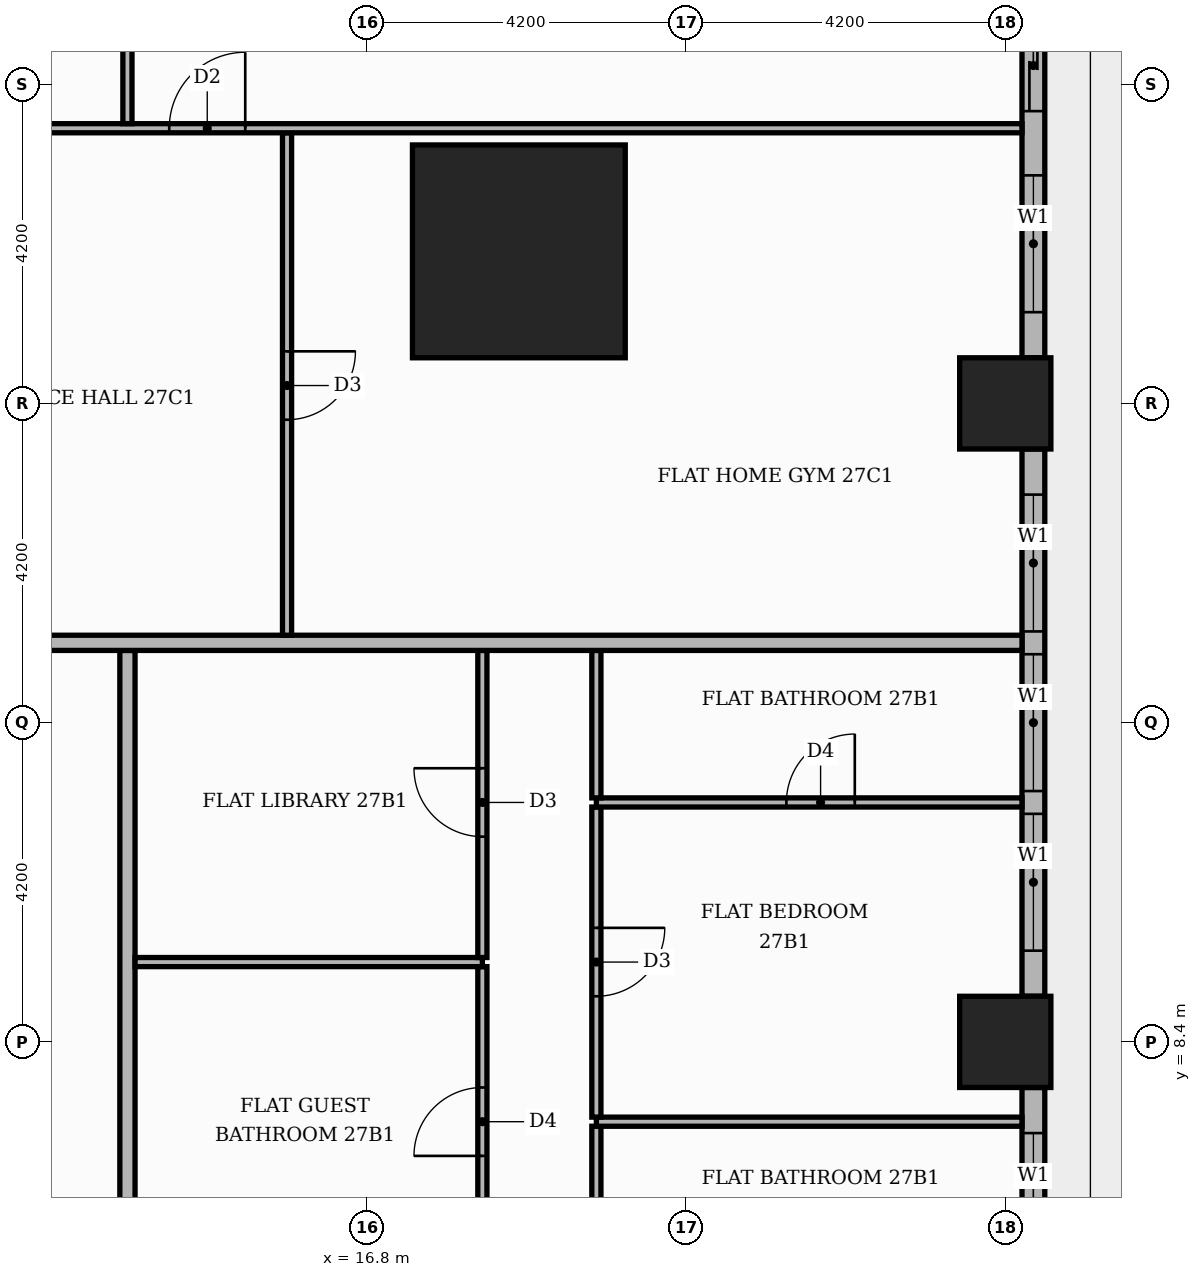
"""IFC4 building model, lengths in metres.
Left out: names, types, materials, properties, quantities, classifications, styles, units other than length and angle.
Written with IfcOpenShell. Run it as: python <this file> out.ifc"""

import sys

from ifc_helpers import new_model, si_unit, direction, frame, frame_2d, origin, origin_2d, place, context, subcontext, project, spatial, rectangle, extrude, element, fill, save


model = new_model("IFC4")
c1 = context("Model", 3, precision=1e-05, world=origin(), true_north=direction((0.0, 1.0)))
c2 = subcontext(c1, "Body", "Model", "MODEL_VIEW")
j1 = project(units=[si_unit("LENGTHUNIT", "METRE"), si_unit("PLANEANGLEUNIT", "RADIAN")], contexts=[c1])
p1 = place(None, origin())
s1 = spatial("IfcSite", under=j1, at=p1, CompositionType="ELEMENT")
p2 = place(p1, origin())
s2 = spatial("IfcBuilding", under=s1, at=p2, CompositionType="ELEMENT")
p3 = place(p2, frame((0.0, 0.0, 114.3)))
s3 = spatial("IfcBuildingStorey", under=s2, at=p3, CompositionType="ELEMENT", Elevation=114.3)
p4 = place(p3, frame((18.8, 18.8, 0.0), z_axis=(0.0, 0.0, 1.0), x_axis=(1.0, 0.0, 0.0)))
e1 = element("IfcColumn", 1, at=p4, inside=s3, PredefinedType="COLUMN", context=c2, shape_type="SweptSolid", body=[
    extrude(rectangle(XDim=2.8, YDim=2.8, at=origin_2d()), origin(), (0.0, 0.0, 1.0), 3.9),
])
for number, where, z_axis, x_axis in (
    (2, (25.2, 8.4, 0.0), (0.0, 0.0, 1.0), (1.0, 0.0, 0.0)),
    (3, (25.2, 16.8, 0.0), (0.0, 0.0, 1.0), (1.0, 0.0, 0.0)),
):
    element("IfcColumn", number, at=place(p3, frame(where, z_axis=z_axis, x_axis=x_axis)), inside=s3, PredefinedType="COLUMN", context=c2, shape_type="SweptSolid", body=[
        extrude(rectangle(XDim=1.2, YDim=1.2, at=origin_2d()), origin(), (0.0, 0.0, 1.0), 3.9),
    ])
p5 = place(p3, frame((25.57, 0.6, 0.0), z_axis=(0.0, 0.0, 1.0), x_axis=(0.0, 1.0, 0.0)))
e4 = element("IfcWall", 4, at=p5, inside=s3, PredefinedType="STANDARD", context=c2, shape_type="SweptSolid", body=[
    extrude(rectangle(XDim=7.2, YDim=0.3, at=frame_2d((3.6, 0.0))), origin(), (0.0, 0.0, 1.0), 3.48),
])
p6 = place(p5, frame((0.6, 0.0, 0.9)))
e5 = element("IfcOpeningElement", 5, at=p6, cuts=e4, PredefinedType="OPENING", context=c2, shape_type="SweptSolid", body=[
    extrude(rectangle(XDim=3.9, YDim=2.1, at=frame_2d((1.95, 1.05))), frame((0.0, 0.16, 0.0), z_axis=(0.0, -1.0, 0.0), x_axis=(1.0, 0.0, 0.0)), (0.0, 0.0, 1.0), 0.32),
])
p7 = place(p5, frame((4.8, 0.0, 0.9)))
e6 = element("IfcOpeningElement", 6, at=p7, cuts=e4, PredefinedType="OPENING", context=c2, shape_type="SweptSolid", body=[
    extrude(rectangle(XDim=1.8, YDim=2.1, at=frame_2d((0.9, 1.05))), frame((0.0, 0.16, 0.0), z_axis=(0.0, -1.0, 0.0), x_axis=(1.0, 0.0, 0.0)), (0.0, 0.0, 1.0), 0.32),
])
p8 = place(p3, frame((25.57, 9.0, 0.0), z_axis=(0.0, 0.0, 1.0), x_axis=(0.0, 1.0, 0.0)))
e7 = element("IfcWall", 7, at=p8, inside=s3, PredefinedType="STANDARD", context=c2, shape_type="SweptSolid", body=[
    extrude(rectangle(XDim=7.2, YDim=0.3, at=frame_2d((3.6, 0.0))), origin(), (0.0, 0.0, 1.0), 3.48),
])
p9 = place(p8, frame((0.6, 0.0, 0.9)))
e8 = element("IfcOpeningElement", 8, at=p9, cuts=e7, PredefinedType="OPENING", context=c2, shape_type="SweptSolid", body=[
    extrude(rectangle(XDim=1.8, YDim=2.1, at=frame_2d((0.9, 1.05))), frame((0.0, 0.16, 0.0), z_axis=(0.0, -1.0, 0.0), x_axis=(1.0, 0.0, 0.0)), (0.0, 0.0, 1.0), 0.32),
])
p10 = place(p8, frame((2.7, 0.0, 0.9)))
e9 = element("IfcOpeningElement", 9, at=p10, cuts=e7, PredefinedType="OPENING", context=c2, shape_type="SweptSolid", body=[
    extrude(rectangle(XDim=1.8, YDim=2.1, at=frame_2d((0.9, 1.05))), frame((0.0, 0.16, 0.0), z_axis=(0.0, -1.0, 0.0), x_axis=(1.0, 0.0, 0.0)), (0.0, 0.0, 1.0), 0.32),
])
p11 = place(p8, frame((4.8, 0.0, 0.9)))
e10 = element("IfcOpeningElement", 10, at=p11, cuts=e7, PredefinedType="OPENING", context=c2, shape_type="SweptSolid", body=[
    extrude(rectangle(XDim=1.8, YDim=2.1, at=frame_2d((0.9, 1.05))), frame((0.0, 0.16, 0.0), z_axis=(0.0, -1.0, 0.0), x_axis=(1.0, 0.0, 0.0)), (0.0, 0.0, 1.0), 0.32),
])
p12 = place(p3, frame((25.57, 17.4, 0.0), z_axis=(0.0, 0.0, 1.0), x_axis=(0.0, 1.0, 0.0)))
e11 = element("IfcWall", 11, at=p12, inside=s3, PredefinedType="STANDARD", context=c2, shape_type="SweptSolid", body=[
    extrude(rectangle(XDim=4.82, YDim=0.3, at=frame_2d((2.41, 0.0))), origin(), (0.0, 0.0, 1.0), 3.48),
])
p13 = place(p12, frame((0.6, 0.0, 0.9)))
e12 = element("IfcOpeningElement", 12, at=p13, cuts=e11, PredefinedType="OPENING", context=c2, shape_type="SweptSolid", body=[
    extrude(rectangle(XDim=1.8, YDim=2.1, at=frame_2d((0.9, 1.05))), frame((0.0, 0.16, 0.0), z_axis=(0.0, -1.0, 0.0), x_axis=(1.0, 0.0, 0.0)), (0.0, 0.0, 1.0), 0.32),
])
p14 = place(p12, frame((3.245, 0.0, 0.0)))
e13 = element("IfcOpeningElement", 13, at=p14, cuts=e11, PredefinedType="OPENING", context=c2, shape_type="SweptSolid", body=[
    extrude(rectangle(XDim=1.2, YDim=2.4, at=frame_2d((0.6, 1.2))), frame((0.0, 0.16, 0.0), z_axis=(0.0, -1.0, 0.0), x_axis=(1.0, 0.0, 0.0)), (0.0, 0.0, 1.0), 0.32),
])
p15 = place(p3, frame((13.65, -13.55, 0.0), z_axis=(0.0, 0.0, 1.0), x_axis=(0.0, 1.0, 0.0)))
e14 = element("IfcWall", 14, at=p15, inside=s3, PredefinedType="PARTITIONING", context=c2, shape_type="SweptSolid", body=[
    extrude(rectangle(XDim=27.1, YDim=0.2, at=frame_2d((13.55, 0.0))), origin(), (0.0, 0.0, 1.0), 3.48),
])
p16 = place(p15, frame((1.45, 0.0, 0.0)))
e15 = element("IfcOpeningElement", 15, at=p16, cuts=e14, PredefinedType="OPENING", context=c2, shape_type="SweptSolid", body=[
    extrude(rectangle(XDim=1.1, YDim=2.4, at=frame_2d((0.55, 1.2))), frame((0.0, 0.11, 0.0), z_axis=(0.0, -1.0, 0.0), x_axis=(1.0, 0.0, 0.0)), (0.0, 0.0, 1.0), 0.22),
])
p17 = place(p3, frame((18.32, 5.31, 0.0), z_axis=(0.0, 0.0, 1.0), x_axis=(0.0, 1.0, 0.0)))
e16 = element("IfcWall", 16, at=p17, inside=s3, PredefinedType="PARTITIONING", context=c2, shape_type="SweptSolid", body=[
    extrude(rectangle(XDim=4.08, YDim=0.12, at=frame_2d((2.04, 0.0))), origin(), (0.0, 0.0, 1.0), 3.48),
])
p18 = place(p17, frame((1.59, 0.0, 0.0)))
e17 = element("IfcOpeningElement", 17, at=p18, cuts=e16, PredefinedType="OPENING", context=c2, shape_type="SweptSolid", body=[
    extrude(rectangle(XDim=0.9, YDim=2.1, at=frame_2d((0.45, 1.05))), frame((0.0, 0.07, 0.0), z_axis=(0.0, -1.0, 0.0), x_axis=(1.0, 0.0, 0.0)), (0.0, 0.0, 1.0), 0.14),
])
p19 = place(p3, frame((19.82, 5.31, 0.0), z_axis=(0.0, 0.0, 1.0), x_axis=(0.0, 1.0, 0.0)))
e18 = element("IfcWall", 18, at=p19, inside=s3, PredefinedType="PARTITIONING", context=c2, shape_type="SweptSolid", body=[
    extrude(rectangle(XDim=1.98, YDim=0.12, at=frame_2d((0.99, 0.0))), origin(), (0.0, 0.0, 1.0), 3.48),
])
p20 = place(p3, frame((19.82, 7.35, 0.0), z_axis=(0.0, 0.0, 1.0), x_axis=(1.0, 0.0, 0.0)))
e19 = element("IfcWall", 19, at=p20, inside=s3, PredefinedType="PARTITIONING", context=c2, shape_type="SweptSolid", body=[
    extrude(rectangle(XDim=5.6, YDim=0.12, at=frame_2d((2.8, 0.0))), origin(), (0.0, 0.0, 1.0), 3.48),
])
p21 = place(p3, frame((19.82, 7.41, 0.0), z_axis=(0.0, 0.0, 1.0), x_axis=(0.0, 1.0, 0.0)))
e20 = element("IfcWall", 20, at=p21, inside=s3, PredefinedType="PARTITIONING", context=c2, shape_type="SweptSolid", body=[
    extrude(rectangle(XDim=4.08, YDim=0.12, at=frame_2d((2.04, 0.0))), origin(), (0.0, 0.0, 1.0), 3.48),
])
p22 = place(p21, frame((1.59, 0.0, 0.0)))
e21 = element("IfcOpeningElement", 21, at=p22, cuts=e20, PredefinedType="OPENING", context=c2, shape_type="SweptSolid", body=[
    extrude(rectangle(XDim=0.9, YDim=2.1, at=frame_2d((0.45, 1.05))), frame((0.0, 0.07, 0.0), z_axis=(0.0, -1.0, 0.0), x_axis=(1.0, 0.0, 0.0)), (0.0, 0.0, 1.0), 0.14),
])
p23 = place(p3, frame((13.75, 9.45, 0.0), z_axis=(0.0, 0.0, 1.0), x_axis=(1.0, 0.0, 0.0)))
e22 = element("IfcWall", 22, at=p23, inside=s3, PredefinedType="PARTITIONING", context=c2, shape_type="SweptSolid", body=[
    extrude(rectangle(XDim=4.57, YDim=0.12, at=frame_2d((2.285, 0.0))), origin(), (0.0, 0.0, 1.0), 3.48),
])
p24 = place(p3, frame((18.32, 9.51, 0.0), z_axis=(0.0, 0.0, 1.0), x_axis=(0.0, 1.0, 0.0)))
e23 = element("IfcWall", 23, at=p24, inside=s3, PredefinedType="PARTITIONING", context=c2, shape_type="SweptSolid", body=[
    extrude(rectangle(XDim=4.04, YDim=0.12, at=frame_2d((2.02, 0.0))), origin(), (0.0, 0.0, 1.0), 3.48),
])
p25 = place(p24, frame((1.59, 0.0, 0.0)))
e24 = element("IfcOpeningElement", 24, at=p25, cuts=e23, PredefinedType="OPENING", context=c2, shape_type="SweptSolid", body=[
    extrude(rectangle(XDim=0.9, YDim=2.1, at=frame_2d((0.45, 1.05))), frame((0.0, 0.07, 0.0), z_axis=(0.0, -1.0, 0.0), x_axis=(1.0, 0.0, 0.0)), (0.0, 0.0, 1.0), 0.14),
])
p26 = place(p3, frame((19.82, 11.55, 0.0), z_axis=(0.0, 0.0, 1.0), x_axis=(1.0, 0.0, 0.0)))
e25 = element("IfcWall", 25, at=p26, inside=s3, PredefinedType="PARTITIONING", context=c2, shape_type="SweptSolid", body=[
    extrude(rectangle(XDim=5.6, YDim=0.12, at=frame_2d((2.8, 0.0))), origin(), (0.0, 0.0, 1.0), 3.48),
])
p27 = place(p26, frame((2.5, 0.0, 0.0)))
e26 = element("IfcOpeningElement", 26, at=p27, cuts=e25, PredefinedType="OPENING", context=c2, shape_type="SweptSolid", body=[
    extrude(rectangle(XDim=0.9, YDim=2.1, at=frame_2d((0.45, 1.05))), frame((0.0, 0.07, 0.0), z_axis=(0.0, -1.0, 0.0), x_axis=(1.0, 0.0, 0.0)), (0.0, 0.0, 1.0), 0.14),
])
p28 = place(p3, frame((19.82, 11.61, 0.0), z_axis=(0.0, 0.0, 1.0), x_axis=(0.0, 1.0, 0.0)))
e27 = element("IfcWall", 27, at=p28, inside=s3, PredefinedType="PARTITIONING", context=c2, shape_type="SweptSolid", body=[
    extrude(rectangle(XDim=1.94, YDim=0.12, at=frame_2d((0.97, 0.0))), origin(), (0.0, 0.0, 1.0), 3.48),
])
p29 = place(p3, frame((-13.65, 13.65, 0.0), z_axis=(0.0, 0.0, 1.0), x_axis=(1.0, 0.0, 0.0)))
e28 = element("IfcWall", 28, at=p29, inside=s3, PredefinedType="PARTITIONING", context=c2, shape_type="SweptSolid", body=[
    extrude(rectangle(XDim=39.07, YDim=0.2, at=frame_2d((19.535, 0.0))), origin(), (0.0, 0.0, 1.0), 3.48),
])
p30 = place(p29, frame((24.65, 0.0, 0.0)))
e29 = element("IfcOpeningElement", 29, at=p30, cuts=e28, PredefinedType="OPENING", context=c2, shape_type="SweptSolid", body=[
    extrude(rectangle(XDim=1.1, YDim=2.4, at=frame_2d((0.55, 1.2))), frame((0.0, 0.11, 0.0), z_axis=(0.0, -1.0, 0.0), x_axis=(1.0, 0.0, 0.0)), (0.0, 0.0, 1.0), 0.22),
])
p31 = place(p3, frame((15.75, 13.75, 0.0), z_axis=(0.0, 0.0, 1.0), x_axis=(0.0, 1.0, 0.0)))
e30 = element("IfcWall", 30, at=p31, inside=s3, PredefinedType="PARTITIONING", context=c2, shape_type="SweptSolid", body=[
    extrude(rectangle(XDim=6.61, YDim=0.12, at=frame_2d((3.305, 0.0))), origin(), (0.0, 0.0, 1.0), 3.48),
])
p32 = place(p31, frame((2.835, 0.0, 0.0)))
e31 = element("IfcOpeningElement", 31, at=p32, cuts=e30, PredefinedType="OPENING", context=c2, shape_type="SweptSolid", body=[
    extrude(rectangle(XDim=0.9, YDim=2.1, at=frame_2d((0.45, 1.05))), frame((0.0, 0.07, 0.0), z_axis=(0.0, -1.0, 0.0), x_axis=(1.0, 0.0, 0.0)), (0.0, 0.0, 1.0), 0.14),
])
p33 = place(p3, frame((-13.55, 20.42, 0.0), z_axis=(0.0, 0.0, 1.0), x_axis=(1.0, 0.0, 0.0)))
e32 = element("IfcWall", 32, at=p33, inside=s3, PredefinedType="PARTITIONING", context=c2, shape_type="SweptSolid", body=[
    extrude(rectangle(XDim=38.97, YDim=0.12, at=frame_2d((19.485, 0.0))), origin(), (0.0, 0.0, 1.0), 3.48),
])
p34 = place(p33, frame((27.75, 0.0, 0.0)))
e33 = element("IfcOpeningElement", 33, at=p34, cuts=e32, PredefinedType="OPENING", context=c2, shape_type="SweptSolid", body=[
    extrude(rectangle(XDim=1.0, YDim=2.1, at=frame_2d((0.5, 1.05))), frame((0.0, 0.07, 0.0), z_axis=(0.0, -1.0, 0.0), x_axis=(1.0, 0.0, 0.0)), (0.0, 0.0, 1.0), 0.14),
])
p35 = place(p33, frame((22.5, 0.0, 0.0)))
e34 = element("IfcOpeningElement", 34, at=p35, cuts=e32, PredefinedType="OPENING", context=c2, shape_type="SweptSolid", body=[
    extrude(rectangle(XDim=1.0, YDim=2.1, at=frame_2d((0.5, 1.05))), frame((0.0, 0.07, 0.0), z_axis=(0.0, -1.0, 0.0), x_axis=(1.0, 0.0, 0.0)), (0.0, 0.0, 1.0), 0.14),
])
p36 = place(p33, frame((14.15, 0.0, 0.0)))
e35 = element("IfcOpeningElement", 35, at=p36, cuts=e32, PredefinedType="OPENING", context=c2, shape_type="SweptSolid", body=[
    extrude(rectangle(XDim=0.9, YDim=2.1, at=frame_2d((0.45, 1.05))), frame((0.0, 0.07, 0.0), z_axis=(0.0, -1.0, 0.0), x_axis=(1.0, 0.0, 0.0)), (0.0, 0.0, 1.0), 0.14),
])
p37 = place(p33, frame((3.65, 0.0, 0.0)))
e36 = element("IfcOpeningElement", 36, at=p37, cuts=e32, PredefinedType="OPENING", context=c2, shape_type="SweptSolid", body=[
    extrude(rectangle(XDim=0.9, YDim=2.1, at=frame_2d((0.45, 1.05))), frame((0.0, 0.07, 0.0), z_axis=(0.0, -1.0, 0.0), x_axis=(1.0, 0.0, 0.0)), (0.0, 0.0, 1.0), 0.14),
])
p38 = place(p3, frame((13.65, 20.48, 0.0), z_axis=(0.0, 0.0, 1.0), x_axis=(0.0, 1.0, 0.0)))
e37 = element("IfcWall", 37, at=p38, inside=s3, PredefinedType="PARTITIONING", context=c2, shape_type="SweptSolid", body=[
    extrude(rectangle(XDim=4.94, YDim=0.12, at=frame_2d((2.47, 0.0))), origin(), (0.0, 0.0, 1.0), 3.48),
])
p39 = place(p7, origin())
e38 = element("IfcWindow", 38, at=p39, inside=s3, PartitioningType="SINGLE_PANEL", PredefinedType="WINDOW", context=c2, shape_type="SweptSolid", body=[
    extrude(rectangle(XDim=1.8, YDim=2.1, at=frame_2d((0.9, 1.05))), frame((0.0, 0.03, 0.0), z_axis=(0.0, -1.0, 0.0), x_axis=(1.0, 0.0, 0.0)), (0.0, 0.0, 1.0), 0.06),
])
fill(e6, e38)
p40 = place(p9, origin())
e39 = element("IfcWindow", 39, at=p40, inside=s3, PartitioningType="SINGLE_PANEL", PredefinedType="WINDOW", context=c2, shape_type="SweptSolid", body=[
    extrude(rectangle(XDim=1.8, YDim=2.1, at=frame_2d((0.9, 1.05))), frame((0.0, 0.03, 0.0), z_axis=(0.0, -1.0, 0.0), x_axis=(1.0, 0.0, 0.0)), (0.0, 0.0, 1.0), 0.06),
])
fill(e8, e39)
p41 = place(p10, origin())
e40 = element("IfcWindow", 40, at=p41, inside=s3, PartitioningType="SINGLE_PANEL", PredefinedType="WINDOW", context=c2, shape_type="SweptSolid", body=[
    extrude(rectangle(XDim=1.8, YDim=2.1, at=frame_2d((0.9, 1.05))), frame((0.0, 0.03, 0.0), z_axis=(0.0, -1.0, 0.0), x_axis=(1.0, 0.0, 0.0)), (0.0, 0.0, 1.0), 0.06),
])
fill(e9, e40)
p42 = place(p11, origin())
e41 = element("IfcWindow", 41, at=p42, inside=s3, PartitioningType="SINGLE_PANEL", PredefinedType="WINDOW", context=c2, shape_type="SweptSolid", body=[
    extrude(rectangle(XDim=1.8, YDim=2.1, at=frame_2d((0.9, 1.05))), frame((0.0, 0.03, 0.0), z_axis=(0.0, -1.0, 0.0), x_axis=(1.0, 0.0, 0.0)), (0.0, 0.0, 1.0), 0.06),
])
fill(e10, e41)
p43 = place(p13, origin())
e42 = element("IfcWindow", 42, at=p43, inside=s3, PartitioningType="SINGLE_PANEL", PredefinedType="WINDOW", context=c2, shape_type="SweptSolid", body=[
    extrude(rectangle(XDim=1.8, YDim=2.1, at=frame_2d((0.9, 1.05))), frame((0.0, 0.03, 0.0), z_axis=(0.0, -1.0, 0.0), x_axis=(1.0, 0.0, 0.0)), (0.0, 0.0, 1.0), 0.06),
])
fill(e12, e42)
p44 = place(p14, origin())
e43 = element("IfcDoor", 43, at=p44, inside=s3, OperationType="SLIDING_TO_RIGHT", PredefinedType="DOOR", context=c2, shape_type="SweptSolid", body=[
    extrude(rectangle(XDim=1.2, YDim=2.4, at=frame_2d((0.6, 1.2))), frame((0.0, 0.025, 0.0), z_axis=(0.0, -1.0, 0.0), x_axis=(1.0, 0.0, 0.0)), (0.0, 0.0, 1.0), 0.05),
])
fill(e13, e43)
p45 = place(p18, origin())
e44 = element("IfcDoor", 44, at=p45, inside=s3, OperationType="SINGLE_SWING_LEFT", PredefinedType="DOOR", context=c2, shape_type="SweptSolid", body=[
    extrude(rectangle(XDim=0.9, YDim=2.1, at=frame_2d((0.45, 1.05))), frame((0.0, 0.025, 0.0), z_axis=(0.0, -1.0, 0.0), x_axis=(1.0, 0.0, 0.0)), (0.0, 0.0, 1.0), 0.05),
])
fill(e17, e44)
p46 = place(p25, origin())
e45 = element("IfcDoor", 45, at=p46, inside=s3, OperationType="SINGLE_SWING_RIGHT", PredefinedType="DOOR", context=c2, shape_type="SweptSolid", body=[
    extrude(rectangle(XDim=0.9, YDim=2.1, at=frame_2d((0.45, 1.05))), frame((0.0, 0.025, 0.0), z_axis=(0.0, -1.0, 0.0), x_axis=(1.0, 0.0, 0.0)), (0.0, 0.0, 1.0), 0.05),
])
fill(e24, e45)
p47 = place(p22, frame((0.9, 0.0, 0.0), z_axis=(0.0, 0.0, 1.0), x_axis=(-1.0, 0.0, 0.0)))
e46 = element("IfcDoor", 46, at=p47, inside=s3, OperationType="SINGLE_SWING_RIGHT", PredefinedType="DOOR", context=c2, shape_type="SweptSolid", body=[
    extrude(rectangle(XDim=0.9, YDim=2.1, at=frame_2d((0.45, 1.05))), frame((0.0, 0.025, 0.0), z_axis=(0.0, -1.0, 0.0), x_axis=(1.0, 0.0, 0.0)), (0.0, 0.0, 1.0), 0.05),
])
fill(e21, e46)
p48 = place(p27, origin())
e47 = element("IfcDoor", 47, at=p48, inside=s3, OperationType="SINGLE_SWING_RIGHT", PredefinedType="DOOR", context=c2, shape_type="SweptSolid", body=[
    extrude(rectangle(XDim=0.9, YDim=2.1, at=frame_2d((0.45, 1.05))), frame((0.0, 0.025, 0.0), z_axis=(0.0, -1.0, 0.0), x_axis=(1.0, 0.0, 0.0)), (0.0, 0.0, 1.0), 0.05),
])
fill(e26, e47)
p49 = place(p32, frame((0.9, 0.0, 0.0), z_axis=(0.0, 0.0, 1.0), x_axis=(-1.0, 0.0, 0.0)))
e48 = element("IfcDoor", 48, at=p49, inside=s3, OperationType="SINGLE_SWING_RIGHT", PredefinedType="DOOR", context=c2, shape_type="SweptSolid", body=[
    extrude(rectangle(XDim=0.9, YDim=2.1, at=frame_2d((0.45, 1.05))), frame((0.0, 0.025, 0.0), z_axis=(0.0, -1.0, 0.0), x_axis=(1.0, 0.0, 0.0)), (0.0, 0.0, 1.0), 0.05),
])
fill(e31, e48)
p50 = place(p34, origin())
e49 = element("IfcDoor", 49, at=p50, inside=s3, OperationType="SINGLE_SWING_RIGHT", PredefinedType="DOOR", context=c2, shape_type="SweptSolid", body=[
    extrude(rectangle(XDim=1.0, YDim=2.1, at=frame_2d((0.5, 1.05))), frame((0.0, 0.025, 0.0), z_axis=(0.0, -1.0, 0.0), x_axis=(1.0, 0.0, 0.0)), (0.0, 0.0, 1.0), 0.05),
])
fill(e33, e49)
save(model, sys.argv[1])
